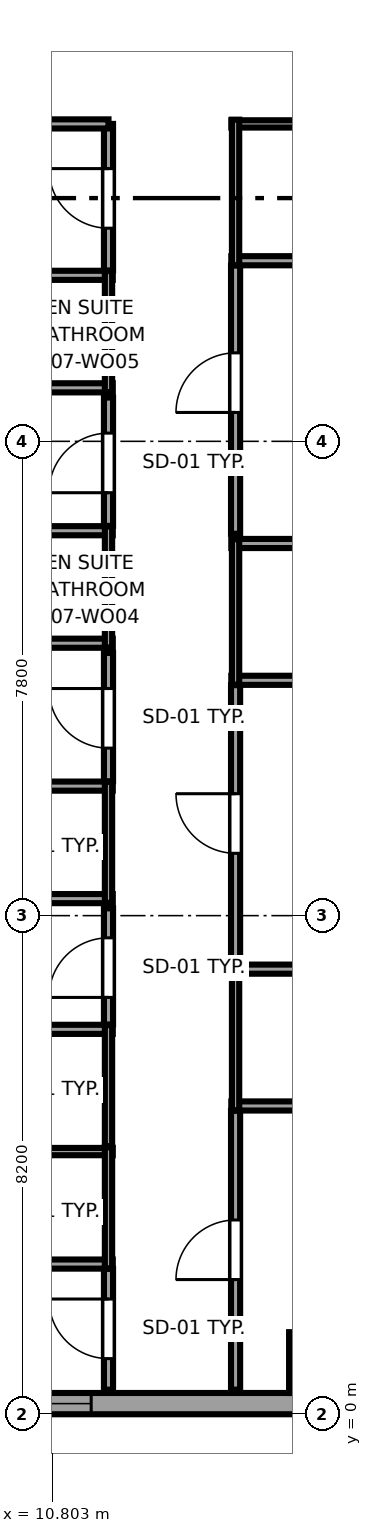
"""IFC4 building model, lengths in metres.
Left out: names, types, materials, properties, quantities, classifications, styles, units other than length and angle.
Written with IfcOpenShell. Run it as: python <this file> out.ifc"""

import sys

from ifc_helpers import new_model, si_unit, direction, frame, frame_2d, origin, origin_2d, place, context, subcontext, project, spatial, rectangle, extrude, source, transform, mapped, element, fill, save


model = new_model("IFC4")
c1 = context("Model", 3, precision=1e-05, world=origin(), true_north=direction((0.0, 1.0)))
c2 = subcontext(c1, "Body", "Model", "MODEL_VIEW")
j1 = project(units=[si_unit("LENGTHUNIT", "METRE"), si_unit("PLANEANGLEUNIT", "RADIAN")], contexts=[c1])
p1 = place(None, origin())
s1 = spatial("IfcSite", under=j1, at=p1, CompositionType="ELEMENT")
p2 = place(p1, origin())
s2 = spatial("IfcBuilding", under=s1, at=p2, CompositionType="ELEMENT")
p3 = place(p2, frame((0.0, 0.0, 35.55)))
s3 = spatial("IfcBuildingStorey", under=s2, at=p3, CompositionType="ELEMENT", Elevation=35.55)
m1 = source(origin(), c2, "Body", "SweptSolid", [
    extrude(rectangle(XDim=1.0, YDim=1.0, at=origin_2d()), origin(), (0.0, 0.0, 1.0), 3.55),
])
p4 = place(p3, frame((15.2, 0.85, 0.0), z_axis=(0.0, 0.0, 1.0), x_axis=(1.0, 0.0, 0.0)))
e1 = element("IfcColumn", 1, at=p4, inside=s3, PredefinedType="COLUMN", context=c2, shape_type="MappedRepresentation", body=[
    mapped(m1, transform((0.0, 0.0, 0.0), x_axis=(1.0, 0.0, 0.0), y_axis=(0.0, 1.0, 0.0), z_axis=(0.0, 0.0, 1.0), scale=1.0)),
])
p5 = place(p3, frame((4.617, 0.175, 0.0), z_axis=(0.0, 0.0, 1.0), x_axis=(1.0, 0.0, 0.0)))
e2 = element("IfcWall", 2, at=p5, inside=s3, PredefinedType="SOLIDWALL", context=c2, shape_type="SweptSolid", body=[
    extrude(rectangle(XDim=18.008, YDim=0.35, at=frame_2d((9.004, 0.0))), origin(), (0.0, 0.0, 1.0), 3.37),
])
p6 = place(p5, frame((4.878, 0.0, 0.68)))
e3 = element("IfcOpeningElement", 3, at=p6, cuts=e2, PredefinedType="OPENING", context=c2, shape_type="SweptSolid", body=[
    extrude(rectangle(XDim=1.95, YDim=1.82, at=frame_2d((0.975, 0.91))), frame((0.0, 0.185, 0.0), z_axis=(0.0, -1.0, 0.0), x_axis=(1.0, 0.0, 0.0)), (0.0, 0.0, 1.0), 0.37),
])
p7 = place(p5, frame((14.332, 0.0, 0.68)))
e4 = element("IfcOpeningElement", 4, at=p7, cuts=e2, PredefinedType="OPENING", context=c2, shape_type="SweptSolid", body=[
    extrude(rectangle(XDim=1.95, YDim=1.82, at=frame_2d((0.975, 0.91))), frame((0.0, 0.185, 0.0), z_axis=(0.0, -1.0, 0.0), x_axis=(1.0, 0.0, 0.0)), (0.0, 0.0, 1.0), 0.37),
])
p8 = place(p3, frame((9.21, 2.47, 0.0), z_axis=(0.0, 0.0, 1.0), x_axis=(1.0, 0.0, 0.0)))
e5 = element("IfcWall", 5, at=p8, inside=s3, PredefinedType="PARTITIONING", context=c2, shape_type="SweptSolid", body=[
    extrude(rectangle(XDim=2.59, YDim=0.15, at=frame_2d((1.295, 0.0))), origin(), (0.0, 0.0, 1.0), 3.37),
])
p9 = place(p3, frame((9.21, 4.32, 0.0), z_axis=(0.0, 0.0, 1.0), x_axis=(1.0, 0.0, 0.0)))
e6 = element("IfcWall", 6, at=p9, inside=s3, PredefinedType="PLUMBINGWALL", context=c2, shape_type="SweptSolid", body=[
    extrude(rectangle(XDim=2.59, YDim=0.12, at=frame_2d((1.295, 0.0))), origin(), (0.0, 0.0, 1.0), 3.37),
])
p10 = place(p3, frame((11.73, 2.4, 0.0), z_axis=(0.0, 0.0, 1.0), x_axis=(0.0, 1.0, 0.0)))
e7 = element("IfcWall", 7, at=p10, inside=s3, PredefinedType="PLUMBINGWALL", context=c2, shape_type="SweptSolid", body=[
    extrude(rectangle(XDim=1.99, YDim=0.12, at=frame_2d((0.995, 0.0))), origin(), (0.0, 0.0, 1.0), 3.37),
])
p11 = place(p3, frame((9.21, 6.33, 0.0), z_axis=(0.0, 0.0, 1.0), x_axis=(1.0, 0.0, 0.0)))
e8 = element("IfcWall", 8, at=p11, inside=s3, PredefinedType="PARTITIONING", context=c2, shape_type="SweptSolid", body=[
    extrude(rectangle(XDim=2.59, YDim=0.15, at=frame_2d((1.295, 0.0))), origin(), (0.0, 0.0, 1.0), 3.37),
])
p12 = place(p3, frame((11.73, 4.41, 0.0), z_axis=(0.0, 0.0, 1.0), x_axis=(0.0, 1.0, 0.0)))
e9 = element("IfcWall", 9, at=p12, inside=s3, PredefinedType="PLUMBINGWALL", context=c2, shape_type="SweptSolid", body=[
    extrude(rectangle(XDim=1.99, YDim=0.12, at=frame_2d((0.995, 0.0))), origin(), (0.0, 0.0, 1.0), 3.37),
])
p13 = place(p3, frame((0.405, 8.48, 0.0), z_axis=(0.0, 0.0, 1.0), x_axis=(1.0, 0.0, 0.0)))
e10 = element("IfcWall", 10, at=p13, inside=s3, PredefinedType="PARTITIONING", context=c2, shape_type="SweptSolid", body=[
    extrude(rectangle(XDim=11.395, YDim=0.15, at=frame_2d((5.698, 0.0))), origin(), (0.0, 0.0, 1.0), 3.37),
])
p14 = place(p3, frame((9.21, 10.33, 0.0), z_axis=(0.0, 0.0, 1.0), x_axis=(1.0, 0.0, 0.0)))
e11 = element("IfcWall", 11, at=p14, inside=s3, PredefinedType="PARTITIONING", context=c2, shape_type="SweptSolid", body=[
    extrude(rectangle(XDim=2.59, YDim=0.15, at=frame_2d((1.295, 0.0))), origin(), (0.0, 0.0, 1.0), 3.37),
])
p15 = place(p3, frame((11.73, 8.41, 0.0), z_axis=(0.0, 0.0, 1.0), x_axis=(0.0, 1.0, 0.0)))
e12 = element("IfcWall", 12, at=p15, inside=s3, PredefinedType="PLUMBINGWALL", context=c2, shape_type="SweptSolid", body=[
    extrude(rectangle(XDim=1.99, YDim=0.12, at=frame_2d((0.995, 0.0))), origin(), (0.0, 0.0, 1.0), 3.37),
])
p16 = place(p3, frame((0.405, 12.68, 0.0), z_axis=(0.0, 0.0, 1.0), x_axis=(1.0, 0.0, 0.0)))
e13 = element("IfcWall", 13, at=p16, inside=s3, PredefinedType="PARTITIONING", context=c2, shape_type="SweptSolid", body=[
    extrude(rectangle(XDim=11.395, YDim=0.15, at=frame_2d((5.698, 0.0))), origin(), (0.0, 0.0, 1.0), 3.37),
])
p17 = place(p3, frame((9.21, 14.53, 0.0), z_axis=(0.0, 0.0, 1.0), x_axis=(1.0, 0.0, 0.0)))
e14 = element("IfcWall", 14, at=p17, inside=s3, PredefinedType="PARTITIONING", context=c2, shape_type="SweptSolid", body=[
    extrude(rectangle(XDim=2.59, YDim=0.15, at=frame_2d((1.295, 0.0))), origin(), (0.0, 0.0, 1.0), 3.37),
])
p18 = place(p3, frame((11.73, 12.61, 0.0), z_axis=(0.0, 0.0, 1.0), x_axis=(0.0, 1.0, 0.0)))
e15 = element("IfcWall", 15, at=p18, inside=s3, PredefinedType="PLUMBINGWALL", context=c2, shape_type="SweptSolid", body=[
    extrude(rectangle(XDim=1.99, YDim=0.12, at=frame_2d((0.995, 0.0))), origin(), (0.0, 0.0, 1.0), 3.37),
])
p19 = place(p3, frame((0.405, 16.88, 0.0), z_axis=(0.0, 0.0, 1.0), x_axis=(1.0, 0.0, 0.0)))
e16 = element("IfcWall", 16, at=p19, inside=s3, PredefinedType="PARTITIONING", context=c2, shape_type="SweptSolid", body=[
    extrude(rectangle(XDim=11.395, YDim=0.15, at=frame_2d((5.698, 0.0))), origin(), (0.0, 0.0, 1.0), 3.37),
])
p20 = place(p3, frame((9.21, 18.73, 0.0), z_axis=(0.0, 0.0, 1.0), x_axis=(1.0, 0.0, 0.0)))
e17 = element("IfcWall", 17, at=p20, inside=s3, PredefinedType="PARTITIONING", context=c2, shape_type="SweptSolid", body=[
    extrude(rectangle(XDim=2.59, YDim=0.15, at=frame_2d((1.295, 0.0))), origin(), (0.0, 0.0, 1.0), 3.37),
])
p21 = place(p3, frame((11.73, 16.81, 0.0), z_axis=(0.0, 0.0, 1.0), x_axis=(0.0, 1.0, 0.0)))
e18 = element("IfcWall", 18, at=p21, inside=s3, PredefinedType="PLUMBINGWALL", context=c2, shape_type="SweptSolid", body=[
    extrude(rectangle(XDim=1.99, YDim=0.12, at=frame_2d((0.995, 0.0))), origin(), (0.0, 0.0, 1.0), 3.37),
])
for number, where, z_axis, x_axis in (
    (19, (13.75, 5.07, 0.0), (0.0, 0.0, 1.0), (1.0, 0.0, 0.0)),
    (20, (13.75, 7.32, 0.0), (0.0, 0.0, 1.0), (1.0, 0.0, 0.0)),
):
    element("IfcWall", number, at=place(p3, frame(where, z_axis=z_axis, x_axis=x_axis)), inside=s3, PredefinedType="PARTITIONING", context=c2, shape_type="SweptSolid", body=[
        extrude(rectangle(XDim=2.59, YDim=0.15, at=frame_2d((1.295, 0.0))), origin(), (0.0, 0.0, 1.0), 3.37),
    ])
p22 = place(p3, frame((13.82, 5.0, 0.0), z_axis=(0.0, 0.0, 1.0), x_axis=(0.0, 1.0, 0.0)))
e21 = element("IfcWall", 21, at=p22, inside=s3, PredefinedType="PLUMBINGWALL", context=c2, shape_type="SweptSolid", body=[
    extrude(rectangle(XDim=2.39, YDim=0.12, at=frame_2d((1.195, 0.0))), origin(), (0.0, 0.0, 1.0), 3.37),
])
for number, where, z_axis, x_axis in (
    (22, (13.75, 12.07, 0.0), (0.0, 0.0, 1.0), (1.0, 0.0, 0.0)),
    (23, (13.75, 14.32, 0.0), (0.0, 0.0, 1.0), (1.0, 0.0, 0.0)),
):
    element("IfcWall", number, at=place(p3, frame(where, z_axis=z_axis, x_axis=x_axis)), inside=s3, PredefinedType="PARTITIONING", context=c2, shape_type="SweptSolid", body=[
        extrude(rectangle(XDim=2.59, YDim=0.15, at=frame_2d((1.295, 0.0))), origin(), (0.0, 0.0, 1.0), 3.37),
    ])
p23 = place(p3, frame((13.82, 12.0, 0.0), z_axis=(0.0, 0.0, 1.0), x_axis=(0.0, 1.0, 0.0)))
e24 = element("IfcWall", 24, at=p23, inside=s3, PredefinedType="PLUMBINGWALL", context=c2, shape_type="SweptSolid", body=[
    extrude(rectangle(XDim=2.39, YDim=0.12, at=frame_2d((1.195, 0.0))), origin(), (0.0, 0.0, 1.0), 3.37),
])
p24 = place(p3, frame((13.75, 18.97, 0.0), z_axis=(0.0, 0.0, 1.0), x_axis=(1.0, 0.0, 0.0)))
e25 = element("IfcWall", 25, at=p24, inside=s3, PredefinedType="PARTITIONING", context=c2, shape_type="SweptSolid", body=[
    extrude(rectangle(XDim=2.59, YDim=0.15, at=frame_2d((1.295, 0.0))), origin(), (0.0, 0.0, 1.0), 3.37),
])
p25 = place(p3, frame((13.75, 21.22, 0.0), z_axis=(0.0, 0.0, 1.0), x_axis=(1.0, 0.0, 0.0)))
e26 = element("IfcWall", 26, at=p25, inside=s3, PredefinedType="PLUMBINGWALL", context=c2, shape_type="SweptSolid", body=[
    extrude(rectangle(XDim=2.59, YDim=0.12, at=frame_2d((1.295, 0.0))), origin(), (0.0, 0.0, 1.0), 3.37),
])
p26 = place(p3, frame((13.82, 18.9, 0.0), z_axis=(0.0, 0.0, 1.0), x_axis=(0.0, 1.0, 0.0)))
e27 = element("IfcWall", 27, at=p26, inside=s3, PredefinedType="PLUMBINGWALL", context=c2, shape_type="SweptSolid", body=[
    extrude(rectangle(XDim=2.39, YDim=0.12, at=frame_2d((1.195, 0.0))), origin(), (0.0, 0.0, 1.0), 3.37),
])
p27 = place(p3, frame((11.73, 0.405, 0.0), z_axis=(0.0, 0.0, 1.0), x_axis=(0.0, 1.0, 0.0)))
e28 = element("IfcWall", 28, at=p27, inside=s3, PredefinedType="PARTITIONING", context=c2, shape_type="SweptSolid", body=[
    extrude(rectangle(XDim=1.985, YDim=0.15, at=frame_2d((0.992, 0.0))), origin(), (0.0, 0.0, 1.0), 3.37),
])
p28 = place(p27, frame((0.51, 0.0, 0.0)))
e29 = element("IfcOpeningElement", 29, at=p28, cuts=e28, PredefinedType="OPENING", context=c2, shape_type="SweptSolid", body=[
    extrude(rectangle(XDim=0.98, YDim=2.12, at=frame_2d((0.49, 1.06))), frame((0.0, 0.085, 0.0), z_axis=(0.0, -1.0, 0.0), x_axis=(1.0, 0.0, 0.0)), (0.0, 0.0, 1.0), 0.17),
])
p29 = place(p3, frame((11.73, 6.41, 0.0), z_axis=(0.0, 0.0, 1.0), x_axis=(0.0, 1.0, 0.0)))
e30 = element("IfcWall", 30, at=p29, inside=s3, PredefinedType="PARTITIONING", context=c2, shape_type="SweptSolid", body=[
    extrude(rectangle(XDim=1.91, YDim=0.15, at=frame_2d((0.955, 0.0))), origin(), (0.0, 0.0, 1.0), 3.37),
])
p30 = place(p29, frame((0.445, 0.0, 0.0)))
e31 = element("IfcOpeningElement", 31, at=p30, cuts=e30, PredefinedType="OPENING", context=c2, shape_type="SweptSolid", body=[
    extrude(rectangle(XDim=0.98, YDim=2.12, at=frame_2d((0.49, 1.06))), frame((0.0, 0.085, 0.0), z_axis=(0.0, -1.0, 0.0), x_axis=(1.0, 0.0, 0.0)), (0.0, 0.0, 1.0), 0.17),
])
p31 = place(p3, frame((11.73, 10.41, 0.0), z_axis=(0.0, 0.0, 1.0), x_axis=(0.0, 1.0, 0.0)))
e32 = element("IfcWall", 32, at=p31, inside=s3, PredefinedType="PARTITIONING", context=c2, shape_type="SweptSolid", body=[
    extrude(rectangle(XDim=2.11, YDim=0.15, at=frame_2d((1.055, 0.0))), origin(), (0.0, 0.0, 1.0), 3.37),
])
p32 = place(p31, frame((0.545, 0.0, 0.0)))
e33 = element("IfcOpeningElement", 33, at=p32, cuts=e32, PredefinedType="OPENING", context=c2, shape_type="SweptSolid", body=[
    extrude(rectangle(XDim=0.98, YDim=2.12, at=frame_2d((0.49, 1.06))), frame((0.0, 0.085, 0.0), z_axis=(0.0, -1.0, 0.0), x_axis=(1.0, 0.0, 0.0)), (0.0, 0.0, 1.0), 0.17),
])
p33 = place(p3, frame((11.73, 14.61, 0.0), z_axis=(0.0, 0.0, 1.0), x_axis=(0.0, 1.0, 0.0)))
e34 = element("IfcWall", 34, at=p33, inside=s3, PredefinedType="PARTITIONING", context=c2, shape_type="SweptSolid", body=[
    extrude(rectangle(XDim=2.11, YDim=0.15, at=frame_2d((1.055, 0.0))), origin(), (0.0, 0.0, 1.0), 3.37),
])
p34 = place(p33, frame((0.545, 0.0, 0.0)))
e35 = element("IfcOpeningElement", 35, at=p34, cuts=e34, PredefinedType="OPENING", context=c2, shape_type="SweptSolid", body=[
    extrude(rectangle(XDim=0.98, YDim=2.12, at=frame_2d((0.49, 1.06))), frame((0.0, 0.085, 0.0), z_axis=(0.0, -1.0, 0.0), x_axis=(1.0, 0.0, 0.0)), (0.0, 0.0, 1.0), 0.17),
])
p35 = place(p3, frame((11.73, 18.81, 0.0), z_axis=(0.0, 0.0, 1.0), x_axis=(0.0, 1.0, 0.0)))
e36 = element("IfcWall", 36, at=p35, inside=s3, PredefinedType="PARTITIONING", context=c2, shape_type="SweptSolid", body=[
    extrude(rectangle(XDim=2.41, YDim=0.15, at=frame_2d((1.205, 0.0))), origin(), (0.0, 0.0, 1.0), 3.37),
])
p36 = place(p35, frame((0.695, 0.0, 0.0)))
e37 = element("IfcOpeningElement", 37, at=p36, cuts=e36, PredefinedType="OPENING", context=c2, shape_type="SweptSolid", body=[
    extrude(rectangle(XDim=0.98, YDim=2.12, at=frame_2d((0.49, 1.06))), frame((0.0, 0.085, 0.0), z_axis=(0.0, -1.0, 0.0), x_axis=(1.0, 0.0, 0.0)), (0.0, 0.0, 1.0), 0.17),
])
p37 = place(p3, frame((0.405, 21.22, 0.0), z_axis=(0.0, 0.0, 1.0), x_axis=(1.0, 0.0, 0.0)))
e38 = element("IfcWall", 38, at=p37, inside=s3, PredefinedType="PARTITIONING", context=c2, shape_type="SweptSolid", body=[
    extrude(rectangle(XDim=11.325, YDim=0.15, at=frame_2d((5.663, 0.0))), origin(), (0.0, 0.0, 1.0), 3.37),
])
p38 = place(p3, frame((13.82, 0.405, 0.0), z_axis=(0.0, 0.0, 1.0), x_axis=(0.0, 1.0, 0.0)))
e39 = element("IfcWall", 39, at=p38, inside=s3, PredefinedType="PARTITIONING", context=c2, shape_type="SweptSolid", body=[
    extrude(rectangle(XDim=4.585, YDim=0.15, at=frame_2d((2.292, 0.0))), origin(), (0.0, 0.0, 1.0), 3.37),
])
p39 = place(p38, frame((1.81, 0.0, 0.0)))
e40 = element("IfcOpeningElement", 40, at=p39, cuts=e39, PredefinedType="OPENING", context=c2, shape_type="SweptSolid", body=[
    extrude(rectangle(XDim=0.98, YDim=2.12, at=frame_2d((0.49, 1.06))), frame((0.0, 0.085, 0.0), z_axis=(0.0, -1.0, 0.0), x_axis=(1.0, 0.0, 0.0)), (0.0, 0.0, 1.0), 0.17),
])
p40 = place(p3, frame((13.82, 7.48, 0.0), z_axis=(0.0, 0.0, 1.0), x_axis=(0.0, 1.0, 0.0)))
e41 = element("IfcWall", 41, at=p40, inside=s3, PredefinedType="PARTITIONING", context=c2, shape_type="SweptSolid", body=[
    extrude(rectangle(XDim=4.51, YDim=0.15, at=frame_2d((2.255, 0.0))), origin(), (0.0, 0.0, 1.0), 3.37),
])
p41 = place(p40, frame((1.745, 0.0, 0.0)))
e42 = element("IfcOpeningElement", 42, at=p41, cuts=e41, PredefinedType="OPENING", context=c2, shape_type="SweptSolid", body=[
    extrude(rectangle(XDim=0.98, YDim=2.12, at=frame_2d((0.49, 1.06))), frame((0.0, 0.085, 0.0), z_axis=(0.0, -1.0, 0.0), x_axis=(1.0, 0.0, 0.0)), (0.0, 0.0, 1.0), 0.17),
])
p42 = place(p3, frame((13.82, 14.48, 0.0), z_axis=(0.0, 0.0, 1.0), x_axis=(0.0, 1.0, 0.0)))
e43 = element("IfcWall", 43, at=p42, inside=s3, PredefinedType="PARTITIONING", context=c2, shape_type="SweptSolid", body=[
    extrude(rectangle(XDim=4.41, YDim=0.15, at=frame_2d((2.205, 0.0))), origin(), (0.0, 0.0, 1.0), 3.37),
])
p43 = place(p42, frame((1.995, 0.0, 0.0)))
e44 = element("IfcOpeningElement", 44, at=p43, cuts=e43, PredefinedType="OPENING", context=c2, shape_type="SweptSolid", body=[
    extrude(rectangle(XDim=0.98, YDim=2.12, at=frame_2d((0.49, 1.06))), frame((0.0, 0.085, 0.0), z_axis=(0.0, -1.0, 0.0), x_axis=(1.0, 0.0, 0.0)), (0.0, 0.0, 1.0), 0.17),
])
m2 = source(origin(), c2, "Body", "SweptSolid", [
    extrude(rectangle(XDim=1.95, YDim=1.82, at=frame_2d((0.975, 0.91))), frame((0.0, 0.09, 0.0), z_axis=(0.0, -1.0, 0.0), x_axis=(1.0, 0.0, 0.0)), (0.0, 0.0, 1.0), 0.06),
])
p44 = place(p6, origin())
e45 = element("IfcWindow", 45, at=p44, inside=s3, PartitioningType="DOUBLE_PANEL_VERTICAL", PredefinedType="WINDOW", context=c2, shape_type="MappedRepresentation", body=[
    mapped(m2, transform((0.0, 0.0, 0.0), x_axis=(1.0, 0.0, 0.0), y_axis=(0.0, 1.0, 0.0), z_axis=(0.0, 0.0, 1.0), scale=1.0)),
])
fill(e3, e45)
m3 = source(origin(), c2, "Body", "SweptSolid", [
    extrude(rectangle(XDim=0.98, YDim=2.12, at=frame_2d((0.49, 1.06))), frame((0.0, 0.025, 0.0), z_axis=(0.0, -1.0, 0.0), x_axis=(1.0, 0.0, 0.0)), (0.0, 0.0, 1.0), 0.05),
])
p45 = place(p28, origin())
e46 = element("IfcDoor", 46, at=p45, inside=s3, OperationType="SINGLE_SWING_RIGHT", PredefinedType="DOOR", context=c2, shape_type="MappedRepresentation", body=[
    mapped(m3, transform((0.0, 0.0, 0.0), x_axis=(1.0, 0.0, 0.0), y_axis=(0.0, 1.0, 0.0), z_axis=(0.0, 0.0, 1.0), scale=1.0)),
])
fill(e29, e46)
p46 = place(p30, origin())
e47 = element("IfcDoor", 47, at=p46, inside=s3, OperationType="SINGLE_SWING_LEFT", PredefinedType="DOOR", context=c2, shape_type="MappedRepresentation", body=[
    mapped(m3, transform((0.0, 0.0, 0.0), x_axis=(1.0, 0.0, 0.0), y_axis=(0.0, 1.0, 0.0), z_axis=(0.0, 0.0, 1.0), scale=1.0)),
])
fill(e31, e47)
p47 = place(p32, origin())
e48 = element("IfcDoor", 48, at=p47, inside=s3, OperationType="SINGLE_SWING_RIGHT", PredefinedType="DOOR", context=c2, shape_type="MappedRepresentation", body=[
    mapped(m3, transform((0.0, 0.0, 0.0), x_axis=(1.0, 0.0, 0.0), y_axis=(0.0, 1.0, 0.0), z_axis=(0.0, 0.0, 1.0), scale=1.0)),
])
fill(e33, e48)
p48 = place(p34, origin())
e49 = element("IfcDoor", 49, at=p48, inside=s3, OperationType="SINGLE_SWING_LEFT", PredefinedType="DOOR", context=c2, shape_type="MappedRepresentation", body=[
    mapped(m3, transform((0.0, 0.0, 0.0), x_axis=(1.0, 0.0, 0.0), y_axis=(0.0, 1.0, 0.0), z_axis=(0.0, 0.0, 1.0), scale=1.0)),
])
fill(e35, e49)
p49 = place(p36, origin())
e50 = element("IfcDoor", 50, at=p49, inside=s3, OperationType="SINGLE_SWING_RIGHT", PredefinedType="DOOR", context=c2, shape_type="MappedRepresentation", body=[
    mapped(m3, transform((0.0, 0.0, 0.0), x_axis=(1.0, 0.0, 0.0), y_axis=(0.0, 1.0, 0.0), z_axis=(0.0, 0.0, 1.0), scale=1.0)),
])
fill(e37, e50)
p50 = place(p39, origin())
e51 = element("IfcDoor", 51, at=p50, inside=s3, OperationType="SINGLE_SWING_LEFT", PredefinedType="DOOR", context=c2, shape_type="MappedRepresentation", body=[
    mapped(m3, transform((0.0, 0.0, 0.0), x_axis=(1.0, 0.0, 0.0), y_axis=(0.0, 1.0, 0.0), z_axis=(0.0, 0.0, 1.0), scale=1.0)),
])
fill(e40, e51)
p51 = place(p41, origin())
e52 = element("IfcDoor", 52, at=p51, inside=s3, OperationType="SINGLE_SWING_RIGHT", PredefinedType="DOOR", context=c2, shape_type="MappedRepresentation", body=[
    mapped(m3, transform((0.0, 0.0, 0.0), x_axis=(1.0, 0.0, 0.0), y_axis=(0.0, 1.0, 0.0), z_axis=(0.0, 0.0, 1.0), scale=1.0)),
])
fill(e42, e52)
p52 = place(p43, origin())
e53 = element("IfcDoor", 53, at=p52, inside=s3, OperationType="SINGLE_SWING_LEFT", PredefinedType="DOOR", context=c2, shape_type="MappedRepresentation", body=[
    mapped(m3, transform((0.0, 0.0, 0.0), x_axis=(1.0, 0.0, 0.0), y_axis=(0.0, 1.0, 0.0), z_axis=(0.0, 0.0, 1.0), scale=1.0)),
])
fill(e44, e53)
save(model, sys.argv[1])
